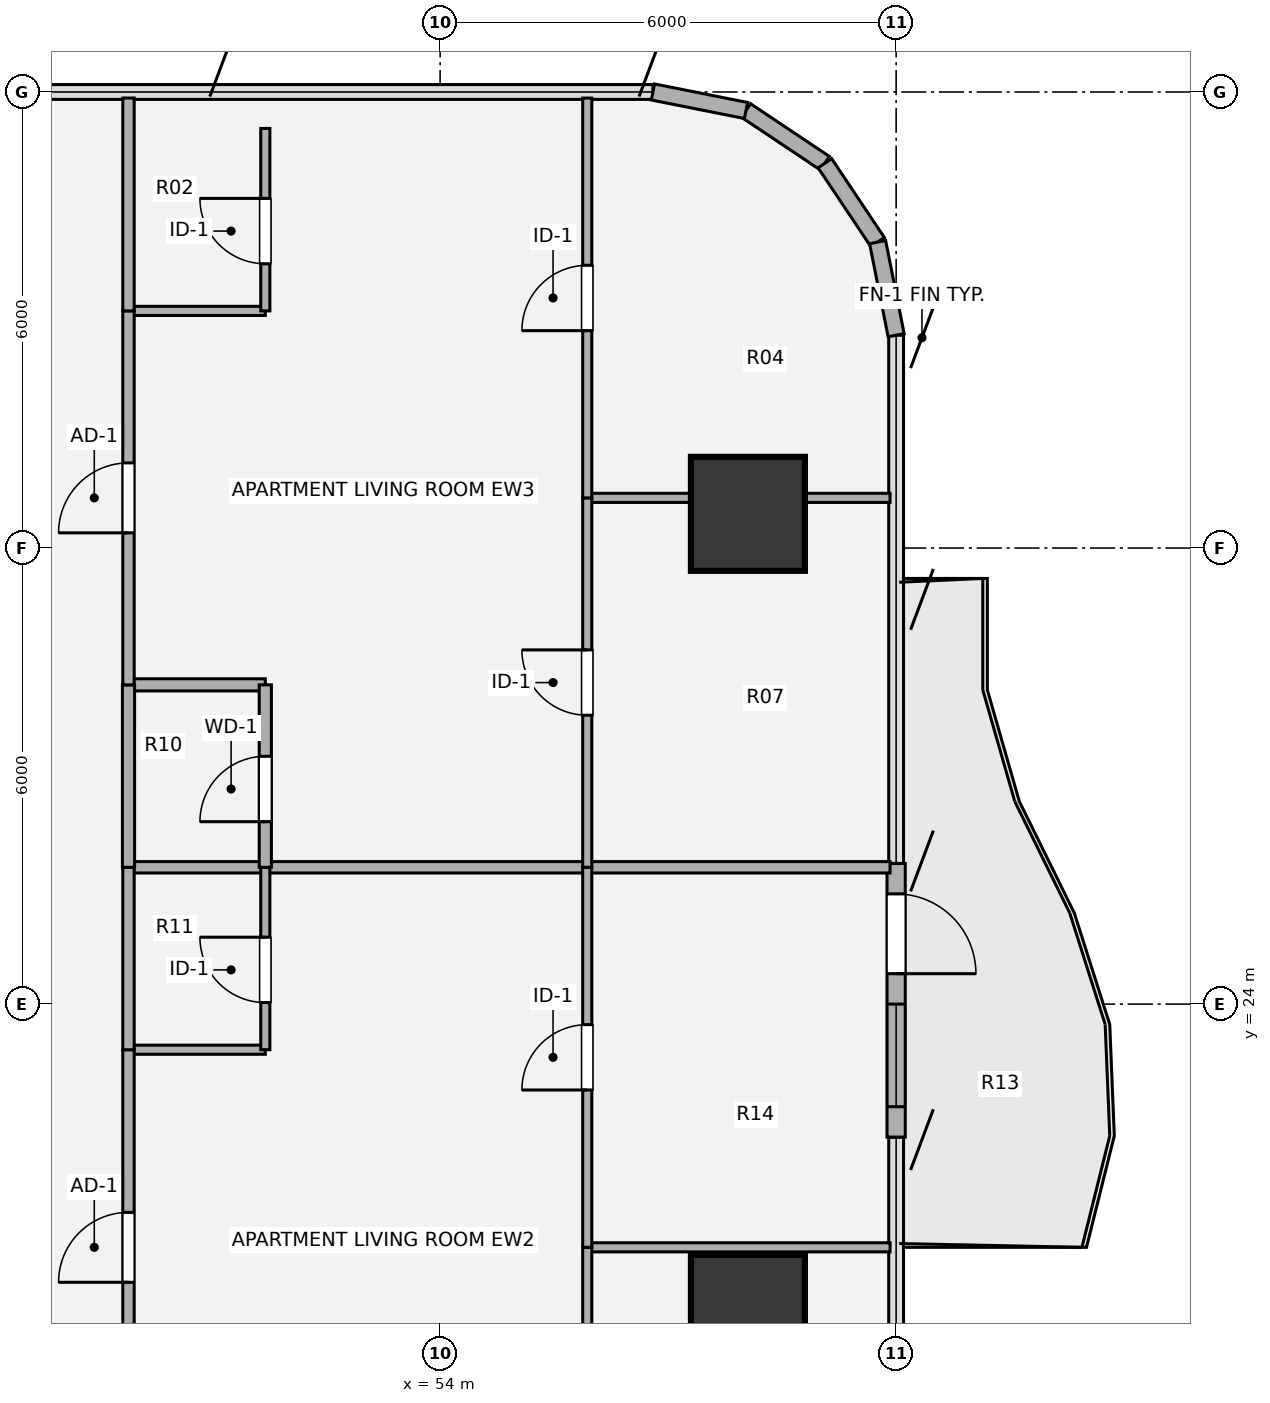
"""IFC4 building model, lengths in metres.
Left out: names, types, materials, properties, quantities, classifications, styles, units other than length and angle.
Written with IfcOpenShell. Run it as: python <this file> out.ifc"""

import sys

from ifc_helpers import new_model, si_unit, direction, frame, frame_2d, origin, origin_2d, place, context, subcontext, project, spatial, rectangle, hollow_circle, extrude, source, transform, mapped, element, fill, save


model = new_model("IFC4")
c1 = context("Model", 3, precision=1e-05, world=origin(), true_north=direction((0.0, 1.0)))
c2 = subcontext(c1, "Body", "Model", "MODEL_VIEW")
j1 = project(units=[si_unit("LENGTHUNIT", "METRE"), si_unit("PLANEANGLEUNIT", "RADIAN")], contexts=[c1])
p1 = place(None, origin())
s1 = spatial("IfcSite", under=j1, at=p1, CompositionType="ELEMENT")
p2 = place(p1, origin())
s2 = spatial("IfcBuilding", under=s1, at=p2, CompositionType="ELEMENT")
p3 = place(p2, frame((0.0, 0.0, 72.36)))
s3 = spatial("IfcBuildingStorey", under=s2, at=p3, CompositionType="ELEMENT", Elevation=72.36)
m1 = source(origin(), c2, "Body", "SweptSolid", [
    extrude(hollow_circle(Radius=0.75, WallThickness=0.05, at=origin_2d()), origin(), (0.0, 0.0, 1.0), 3.78),
])
for number, where, z_axis, x_axis in (
    (1, (58.05, 19.95, 0.0), (0.0, 0.0, 1.0), (1.0, 0.0, 0.0)),
    (2, (58.05, 30.45, 0.0), (0.0, 0.0, 1.0), (1.0, 0.0, 0.0)),
):
    element("IfcColumn", number, at=place(p3, frame(where, z_axis=z_axis, x_axis=x_axis)), inside=s3, PredefinedType="COLUMN", context=c2, shape_type="MappedRepresentation", body=[
        mapped(m1, transform((0.0, 0.0, 0.0), x_axis=(1.0, 0.0, 0.0), y_axis=(0.0, 1.0, 0.0), z_axis=(0.0, 0.0, 1.0), scale=1.0)),
    ])
for number, where, z_axis, x_axis in (
    (3, (58.025, 35.756, 0.0), (0.0, 0.0, 1.0), (0.831, -0.556, 0.0)),
    (4, (59.063, 35.063, 0.0), (0.0, 0.0, 1.0), (0.556, -0.831, 0.0)),
    (5, (59.756, 34.025, 0.0), (0.0, 0.0, 1.0), (0.195, -0.981, 0.0)),
):
    element("IfcWall", number, at=place(p3, frame(where, z_axis=z_axis, x_axis=x_axis)), inside=s3, PredefinedType="SOLIDWALL", context=c2, shape_type="SweptSolid", body=[
        extrude(rectangle(XDim=1.249, YDim=0.215, at=frame_2d((0.624, 0.0))), origin(), (0.0, 0.0, 1.0), 3.53),
    ])
p4 = place(p3, frame((60.0, 25.85, 0.0), z_axis=(0.0, 0.0, 1.0), x_axis=(0.0, -1.0, 0.0)))
e6 = element("IfcWall", 6, at=p4, inside=s3, PredefinedType="SOLIDWALL", context=c2, shape_type="SweptSolid", body=[
    extrude(rectangle(XDim=3.6, YDim=0.24, at=frame_2d((1.8, 0.0))), origin(), (0.0, 0.0, 1.0), 3.53),
])
p5 = place(p4, frame((0.4, 0.0, 0.0)))
e7 = element("IfcOpeningElement", 7, at=p5, cuts=e6, PredefinedType="OPENING", context=c2, shape_type="SweptSolid", body=[
    extrude(rectangle(XDim=1.05, YDim=2.15, at=origin_2d()), frame((0.525, 0.13, 1.075), z_axis=(0.0, -1.0, 0.0), x_axis=(1.0, 0.0, 0.0)), (0.0, 0.0, 1.0), 0.26),
])
p6 = place(p4, frame((1.85, 0.0, 0.85)))
e8 = element("IfcOpeningElement", 8, at=p6, cuts=e6, PredefinedType="OPENING", context=c2, shape_type="SweptSolid", body=[
    extrude(rectangle(XDim=1.35, YDim=1.35, at=origin_2d()), frame((0.675, 0.13, 0.675), z_axis=(0.0, -1.0, 0.0), x_axis=(1.0, 0.0, 0.0)), (0.0, 0.0, 1.0), 0.26),
])
p7 = place(p3, frame((56.8, 36.0, 0.0), z_axis=(0.0, 0.0, 1.0), x_axis=(0.980775717779, -0.195138390419, 0.0)))
e9 = element("IfcWall", 9, at=p7, inside=s3, PredefinedType="SOLIDWALL", context=c2, shape_type="SweptSolid", body=[
    extrude(rectangle(XDim=1.249, YDim=0.215, at=frame_2d((0.624, 0.0))), origin(), (0.0, 0.0, 1.0), 3.53),
])
p8 = place(p3, frame((55.936, 20.8, 0.0), z_axis=(0.0, 0.0, 1.0), x_axis=(1.0, 0.0, 0.0)))
e10 = element("IfcWall", 10, at=p8, inside=s3, PredefinedType="PARTITIONING", context=c2, shape_type="SweptSolid", body=[
    extrude(rectangle(XDim=3.984, YDim=0.12, at=frame_2d((1.992, 0.0))), origin(), (0.0, 0.0, 1.0), 3.055),
])
p9 = place(p3, frame((49.9, 23.4, 0.0), z_axis=(0.0, 0.0, 1.0), x_axis=(1.0, 0.0, 0.0)))
e11 = element("IfcWall", 11, at=p9, inside=s3, PredefinedType="PARTITIONING", context=c2, shape_type="SweptSolid", body=[
    extrude(rectangle(XDim=1.8, YDim=0.12, at=frame_2d((0.9, 0.0))), origin(), (0.0, 0.0, 1.0), 2.982),
])
p10 = place(p3, frame((49.9, 25.8, 0.0), z_axis=(0.0, 0.0, 1.0), x_axis=(1.0, 0.0, 0.0)))
e12 = element("IfcWall", 12, at=p10, inside=s3, PredefinedType="PARTITIONING", context=c2, shape_type="SweptSolid", body=[
    extrude(rectangle(XDim=10.02, YDim=0.15, at=frame_2d((5.01, 0.0))), origin(), (0.0, 0.0, 1.0), 2.982),
])
p11 = place(p3, frame((49.9, 28.2, 0.0), z_axis=(0.0, 0.0, 1.0), x_axis=(1.0, 0.0, 0.0)))
e13 = element("IfcWall", 13, at=p11, inside=s3, PredefinedType="PLUMBINGWALL", context=c2, shape_type="SweptSolid", body=[
    extrude(rectangle(XDim=1.8, YDim=0.16, at=frame_2d((0.9, 0.0))), origin(), (0.0, 0.0, 1.0), 2.982),
])
p12 = place(p3, frame((55.936, 30.66, 0.0), z_axis=(0.0, 0.0, 1.0), x_axis=(1.0, 0.0, 0.0)))
e14 = element("IfcWall", 14, at=p12, inside=s3, PredefinedType="PARTITIONING", context=c2, shape_type="SweptSolid", body=[
    extrude(rectangle(XDim=3.984, YDim=0.12, at=frame_2d((1.992, 0.0))), origin(), (0.0, 0.0, 1.0), 2.903),
])
p13 = place(p3, frame((49.9, 33.12, 0.0), z_axis=(0.0, 0.0, 1.0), x_axis=(1.0, 0.0, 0.0)))
e15 = element("IfcWall", 15, at=p13, inside=s3, PredefinedType="PARTITIONING", context=c2, shape_type="SweptSolid", body=[
    extrude(rectangle(XDim=1.8, YDim=0.12, at=frame_2d((0.9, 0.0))), origin(), (0.0, 0.0, 1.0), 3.055),
])
p14 = place(p3, frame((49.9, 18.2, 0.0), z_axis=(0.0, 0.0, 1.0), x_axis=(0.0, 1.0, 0.0)))
e16 = element("IfcWall", 16, at=p14, inside=s3, PredefinedType="PARTITIONING", context=c2, shape_type="SweptSolid", body=[
    extrude(rectangle(XDim=5.2, YDim=0.15, at=frame_2d((2.6, 0.0))), origin(), (0.0, 0.0, 1.0), 3.5),
])
p15 = place(p14, frame((2.14, 0.0, 0.0)))
e17 = element("IfcOpeningElement", 17, at=p15, cuts=e16, PredefinedType="OPENING", context=c2, shape_type="SweptSolid", body=[
    extrude(rectangle(XDim=0.92, YDim=2.1, at=origin_2d()), frame((0.46, 0.085, 1.05), z_axis=(0.0, -1.0, 0.0), x_axis=(1.0, 0.0, 0.0)), (0.0, 0.0, 1.0), 0.17),
])
p16 = place(p3, frame((49.9, 23.4, 0.0), z_axis=(0.0, 0.0, 1.0), x_axis=(0.0, 1.0, 0.0)))
e18 = element("IfcWall", 18, at=p16, inside=s3, PredefinedType="PARTITIONING", context=c2, shape_type="SweptSolid", body=[
    extrude(rectangle(XDim=2.4, YDim=0.15, at=frame_2d((1.2, 0.0))), origin(), (0.0, 0.0, 1.0), 3.5),
])
p17 = place(p3, frame((49.9, 25.8, 0.0), z_axis=(0.0, 0.0, 1.0), x_axis=(0.0, 1.0, 0.0)))
e19 = element("IfcWall", 19, at=p17, inside=s3, PredefinedType="PLUMBINGWALL", context=c2, shape_type="SweptSolid", body=[
    extrude(rectangle(XDim=2.4, YDim=0.16, at=frame_2d((1.2, 0.0))), origin(), (0.0, 0.0, 1.0), 3.5),
])
p18 = place(p3, frame((49.9, 28.2, 0.0), z_axis=(0.0, 0.0, 1.0), x_axis=(0.0, 1.0, 0.0)))
e20 = element("IfcWall", 20, at=p18, inside=s3, PredefinedType="PARTITIONING", context=c2, shape_type="SweptSolid", body=[
    extrude(rectangle(XDim=4.92, YDim=0.15, at=frame_2d((2.46, 0.0))), origin(), (0.0, 0.0, 1.0), 3.5),
])
p19 = place(p18, frame((2.0, 0.0, 0.0)))
e21 = element("IfcOpeningElement", 21, at=p19, cuts=e20, PredefinedType="OPENING", context=c2, shape_type="SweptSolid", body=[
    extrude(rectangle(XDim=0.92, YDim=2.1, at=origin_2d()), frame((0.46, 0.085, 1.05), z_axis=(0.0, -1.0, 0.0), x_axis=(1.0, 0.0, 0.0)), (0.0, 0.0, 1.0), 0.17),
])
p20 = place(p3, frame((49.9, 33.12, 0.0), z_axis=(0.0, 0.0, 1.0), x_axis=(0.0, 1.0, 0.0)))
e22 = element("IfcWall", 22, at=p20, inside=s3, PredefinedType="PARTITIONING", context=c2, shape_type="SweptSolid", body=[
    extrude(rectangle(XDim=2.8, YDim=0.15, at=frame_2d((1.4, 0.0))), origin(), (0.0, 0.0, 1.0), 3.5),
])
p21 = place(p3, frame((51.7, 23.4, 0.0), z_axis=(0.0, 0.0, 1.0), x_axis=(0.0, 1.0, 0.0)))
e23 = element("IfcWall", 23, at=p21, inside=s3, PredefinedType="PARTITIONING", context=c2, shape_type="SweptSolid", body=[
    extrude(rectangle(XDim=2.4, YDim=0.12, at=frame_2d((1.2, 0.0))), origin(), (0.0, 0.0, 1.0), 3.5),
])
p22 = place(p21, frame((0.62, 0.0, 0.0)))
e24 = element("IfcOpeningElement", 24, at=p22, cuts=e23, PredefinedType="OPENING", context=c2, shape_type="SweptSolid", body=[
    extrude(rectangle(XDim=0.86, YDim=2.1, at=origin_2d()), frame((0.43, 0.07, 1.05), z_axis=(0.0, -1.0, 0.0), x_axis=(1.0, 0.0, 0.0)), (0.0, 0.0, 1.0), 0.14),
])
p23 = place(p3, frame((51.7, 25.8, 0.0), z_axis=(0.0, 0.0, 1.0), x_axis=(0.0, 1.0, 0.0)))
e25 = element("IfcWall", 25, at=p23, inside=s3, PredefinedType="PLUMBINGWALL", context=c2, shape_type="SweptSolid", body=[
    extrude(rectangle(XDim=2.4, YDim=0.16, at=frame_2d((1.2, 0.0))), origin(), (0.0, 0.0, 1.0), 3.5),
])
p24 = place(p23, frame((0.6, 0.0, 0.0)))
e26 = element("IfcOpeningElement", 26, at=p24, cuts=e25, PredefinedType="OPENING", context=c2, shape_type="SweptSolid", body=[
    extrude(rectangle(XDim=0.86, YDim=2.1, at=origin_2d()), frame((0.43, 0.09, 1.05), z_axis=(0.0, -1.0, 0.0), x_axis=(1.0, 0.0, 0.0)), (0.0, 0.0, 1.0), 0.18),
])
p25 = place(p3, frame((51.7, 33.12, 0.0), z_axis=(0.0, 0.0, 1.0), x_axis=(0.0, 1.0, 0.0)))
e27 = element("IfcWall", 27, at=p25, inside=s3, PredefinedType="PARTITIONING", context=c2, shape_type="SweptSolid", body=[
    extrude(rectangle(XDim=2.4, YDim=0.12, at=frame_2d((1.2, 0.0))), origin(), (0.0, 0.0, 1.0), 3.5),
])
p26 = place(p25, frame((0.62, 0.0, 0.0)))
e28 = element("IfcOpeningElement", 28, at=p26, cuts=e27, PredefinedType="OPENING", context=c2, shape_type="SweptSolid", body=[
    extrude(rectangle(XDim=0.86, YDim=2.1, at=origin_2d()), frame((0.43, 0.07, 1.05), z_axis=(0.0, -1.0, 0.0), x_axis=(1.0, 0.0, 0.0)), (0.0, 0.0, 1.0), 0.14),
])
p27 = place(p3, frame((55.936, 15.8, 0.0), z_axis=(0.0, 0.0, 1.0), x_axis=(0.0, 1.0, 0.0)))
e29 = element("IfcWall", 29, at=p27, inside=s3, PredefinedType="PARTITIONING", context=c2, shape_type="SweptSolid", body=[
    extrude(rectangle(XDim=5.0, YDim=0.12, at=frame_2d((2.5, 0.0))), origin(), (0.0, 0.0, 1.0), 3.5),
])
p28 = place(p27, frame((2.07, 0.0, 0.0)))
e30 = element("IfcOpeningElement", 30, at=p28, cuts=e29, PredefinedType="OPENING", context=c2, shape_type="SweptSolid", body=[
    extrude(rectangle(XDim=0.86, YDim=2.1, at=origin_2d()), frame((0.43, 0.07, 1.05), z_axis=(0.0, -1.0, 0.0), x_axis=(1.0, 0.0, 0.0)), (0.0, 0.0, 1.0), 0.14),
])
p29 = place(p3, frame((55.936, 20.8, 0.0), z_axis=(0.0, 0.0, 1.0), x_axis=(0.0, 1.0, 0.0)))
e31 = element("IfcWall", 31, at=p29, inside=s3, PredefinedType="PARTITIONING", context=c2, shape_type="SweptSolid", body=[
    extrude(rectangle(XDim=5.0, YDim=0.12, at=frame_2d((2.5, 0.0))), origin(), (0.0, 0.0, 1.0), 3.5),
])
p30 = place(p29, frame((2.07, 0.0, 0.0)))
e32 = element("IfcOpeningElement", 32, at=p30, cuts=e31, PredefinedType="OPENING", context=c2, shape_type="SweptSolid", body=[
    extrude(rectangle(XDim=0.86, YDim=2.1, at=origin_2d()), frame((0.43, 0.07, 1.05), z_axis=(0.0, -1.0, 0.0), x_axis=(1.0, 0.0, 0.0)), (0.0, 0.0, 1.0), 0.14),
])
p31 = place(p3, frame((55.936, 25.8, 0.0), z_axis=(0.0, 0.0, 1.0), x_axis=(0.0, 1.0, 0.0)))
e33 = element("IfcWall", 33, at=p31, inside=s3, PredefinedType="PARTITIONING", context=c2, shape_type="SweptSolid", body=[
    extrude(rectangle(XDim=4.86, YDim=0.12, at=frame_2d((2.43, 0.0))), origin(), (0.0, 0.0, 1.0), 3.5),
])
p32 = place(p31, frame((2.0, 0.0, 0.0)))
e34 = element("IfcOpeningElement", 34, at=p32, cuts=e33, PredefinedType="OPENING", context=c2, shape_type="SweptSolid", body=[
    extrude(rectangle(XDim=0.86, YDim=2.1, at=origin_2d()), frame((0.43, 0.07, 1.05), z_axis=(0.0, -1.0, 0.0), x_axis=(1.0, 0.0, 0.0)), (0.0, 0.0, 1.0), 0.14),
])
p33 = place(p3, frame((55.936, 30.66, 0.0), z_axis=(0.0, 0.0, 1.0), x_axis=(0.0, 1.0, 0.0)))
e35 = element("IfcWall", 35, at=p33, inside=s3, PredefinedType="PARTITIONING", context=c2, shape_type="SweptSolid", body=[
    extrude(rectangle(XDim=5.26, YDim=0.12, at=frame_2d((2.63, 0.0))), origin(), (0.0, 0.0, 1.0), 3.5),
])
p34 = place(p33, frame((2.2, 0.0, 0.0)))
e36 = element("IfcOpeningElement", 36, at=p34, cuts=e35, PredefinedType="OPENING", context=c2, shape_type="SweptSolid", body=[
    extrude(rectangle(XDim=0.86, YDim=2.1, at=origin_2d()), frame((0.43, 0.07, 1.05), z_axis=(0.0, -1.0, 0.0), x_axis=(1.0, 0.0, 0.0)), (0.0, 0.0, 1.0), 0.14),
])
m2 = source(origin(), c2, "Body", "SweptSolid", [
    extrude(rectangle(XDim=1.05, YDim=2.15, at=origin_2d()), frame((0.525, 0.025, 1.075), z_axis=(0.0, -1.0, 0.0), x_axis=(1.0, 0.0, 0.0)), (0.0, 0.0, 1.0), 0.05),
])
p35 = place(p5, origin())
e37 = element("IfcDoor", 37, at=p35, inside=s3, OperationType="SINGLE_SWING_RIGHT", PredefinedType="DOOR", context=c2, shape_type="MappedRepresentation", body=[
    mapped(m2, transform((0.0, 0.0, 0.0), x_axis=(1.0, 0.0, 0.0), y_axis=(0.0, 1.0, 0.0), z_axis=(0.0, 0.0, 1.0), scale=1.0)),
])
fill(e7, e37)
m3 = source(origin(), c2, "Body", "SweptSolid", [
    extrude(rectangle(XDim=1.35, YDim=1.35, at=origin_2d()), frame((0.675, 0.03, 0.675), z_axis=(0.0, -1.0, 0.0), x_axis=(1.0, 0.0, 0.0)), (0.0, 0.0, 1.0), 0.06),
])
p36 = place(p6, origin())
e38 = element("IfcWindow", 38, at=p36, inside=s3, PartitioningType="SINGLE_PANEL", PredefinedType="WINDOW", context=c2, shape_type="MappedRepresentation", body=[
    mapped(m3, transform((0.0, 0.0, 0.0), x_axis=(1.0, 0.0, 0.0), y_axis=(0.0, 1.0, 0.0), z_axis=(0.0, 0.0, 1.0), scale=1.0)),
])
fill(e8, e38)
m4 = source(origin(), c2, "Body", "SweptSolid", [
    extrude(rectangle(XDim=0.92, YDim=2.1, at=origin_2d()), frame((0.46, 0.025, 1.05), z_axis=(0.0, -1.0, 0.0), x_axis=(1.0, 0.0, 0.0)), (0.0, 0.0, 1.0), 0.05),
])
p37 = place(p15, origin())
e39 = element("IfcDoor", 39, at=p37, inside=s3, OperationType="SINGLE_SWING_LEFT", PredefinedType="DOOR", context=c2, shape_type="MappedRepresentation", body=[
    mapped(m4, transform((0.0, 0.0, 0.0), x_axis=(1.0, 0.0, 0.0), y_axis=(0.0, 1.0, 0.0), z_axis=(0.0, 0.0, 1.0), scale=1.0)),
])
fill(e17, e39)
p38 = place(p19, origin())
e40 = element("IfcDoor", 40, at=p38, inside=s3, OperationType="SINGLE_SWING_LEFT", PredefinedType="DOOR", context=c2, shape_type="MappedRepresentation", body=[
    mapped(m4, transform((0.0, 0.0, 0.0), x_axis=(1.0, 0.0, 0.0), y_axis=(0.0, 1.0, 0.0), z_axis=(0.0, 0.0, 1.0), scale=1.0)),
])
fill(e21, e40)
m5 = source(origin(), c2, "Body", "SweptSolid", [
    extrude(rectangle(XDim=0.86, YDim=2.1, at=origin_2d()), frame((0.43, 0.025, 1.05), z_axis=(0.0, -1.0, 0.0), x_axis=(1.0, 0.0, 0.0)), (0.0, 0.0, 1.0), 0.05),
])
p39 = place(p22, origin())
e41 = element("IfcDoor", 41, at=p39, inside=s3, OperationType="SINGLE_SWING_RIGHT", PredefinedType="DOOR", context=c2, shape_type="MappedRepresentation", body=[
    mapped(m5, transform((0.0, 0.0, 0.0), x_axis=(1.0, 0.0, 0.0), y_axis=(0.0, 1.0, 0.0), z_axis=(0.0, 0.0, 1.0), scale=1.0)),
])
fill(e24, e41)
m6 = source(origin(), c2, "Body", "SweptSolid", [
    extrude(rectangle(XDim=0.86, YDim=2.1, at=origin_2d()), frame((0.43, 0.025, 1.05), z_axis=(0.0, -1.0, 0.0), x_axis=(1.0, 0.0, 0.0)), (0.0, 0.0, 1.0), 0.05),
])
p40 = place(p24, origin())
e42 = element("IfcDoor", 42, at=p40, inside=s3, OperationType="SINGLE_SWING_LEFT", PredefinedType="DOOR", context=c2, shape_type="MappedRepresentation", body=[
    mapped(m6, transform((0.0, 0.0, 0.0), x_axis=(1.0, 0.0, 0.0), y_axis=(0.0, 1.0, 0.0), z_axis=(0.0, 0.0, 1.0), scale=1.0)),
])
fill(e26, e42)
p41 = place(p26, origin())
e43 = element("IfcDoor", 43, at=p41, inside=s3, OperationType="SINGLE_SWING_RIGHT", PredefinedType="DOOR", context=c2, shape_type="MappedRepresentation", body=[
    mapped(m5, transform((0.0, 0.0, 0.0), x_axis=(1.0, 0.0, 0.0), y_axis=(0.0, 1.0, 0.0), z_axis=(0.0, 0.0, 1.0), scale=1.0)),
])
fill(e28, e43)
p42 = place(p30, origin())
e44 = element("IfcDoor", 44, at=p42, inside=s3, OperationType="SINGLE_SWING_LEFT", PredefinedType="DOOR", context=c2, shape_type="MappedRepresentation", body=[
    mapped(m5, transform((0.0, 0.0, 0.0), x_axis=(1.0, 0.0, 0.0), y_axis=(0.0, 1.0, 0.0), z_axis=(0.0, 0.0, 1.0), scale=1.0)),
])
fill(e32, e44)
p43 = place(p32, origin())
e45 = element("IfcDoor", 45, at=p43, inside=s3, OperationType="SINGLE_SWING_RIGHT", PredefinedType="DOOR", context=c2, shape_type="MappedRepresentation", body=[
    mapped(m5, transform((0.0, 0.0, 0.0), x_axis=(1.0, 0.0, 0.0), y_axis=(0.0, 1.0, 0.0), z_axis=(0.0, 0.0, 1.0), scale=1.0)),
])
fill(e34, e45)
p44 = place(p34, origin())
e46 = element("IfcDoor", 46, at=p44, inside=s3, OperationType="SINGLE_SWING_LEFT", PredefinedType="DOOR", context=c2, shape_type="MappedRepresentation", body=[
    mapped(m5, transform((0.0, 0.0, 0.0), x_axis=(1.0, 0.0, 0.0), y_axis=(0.0, 1.0, 0.0), z_axis=(0.0, 0.0, 1.0), scale=1.0)),
])
fill(e36, e46)
save(model, sys.argv[1])
